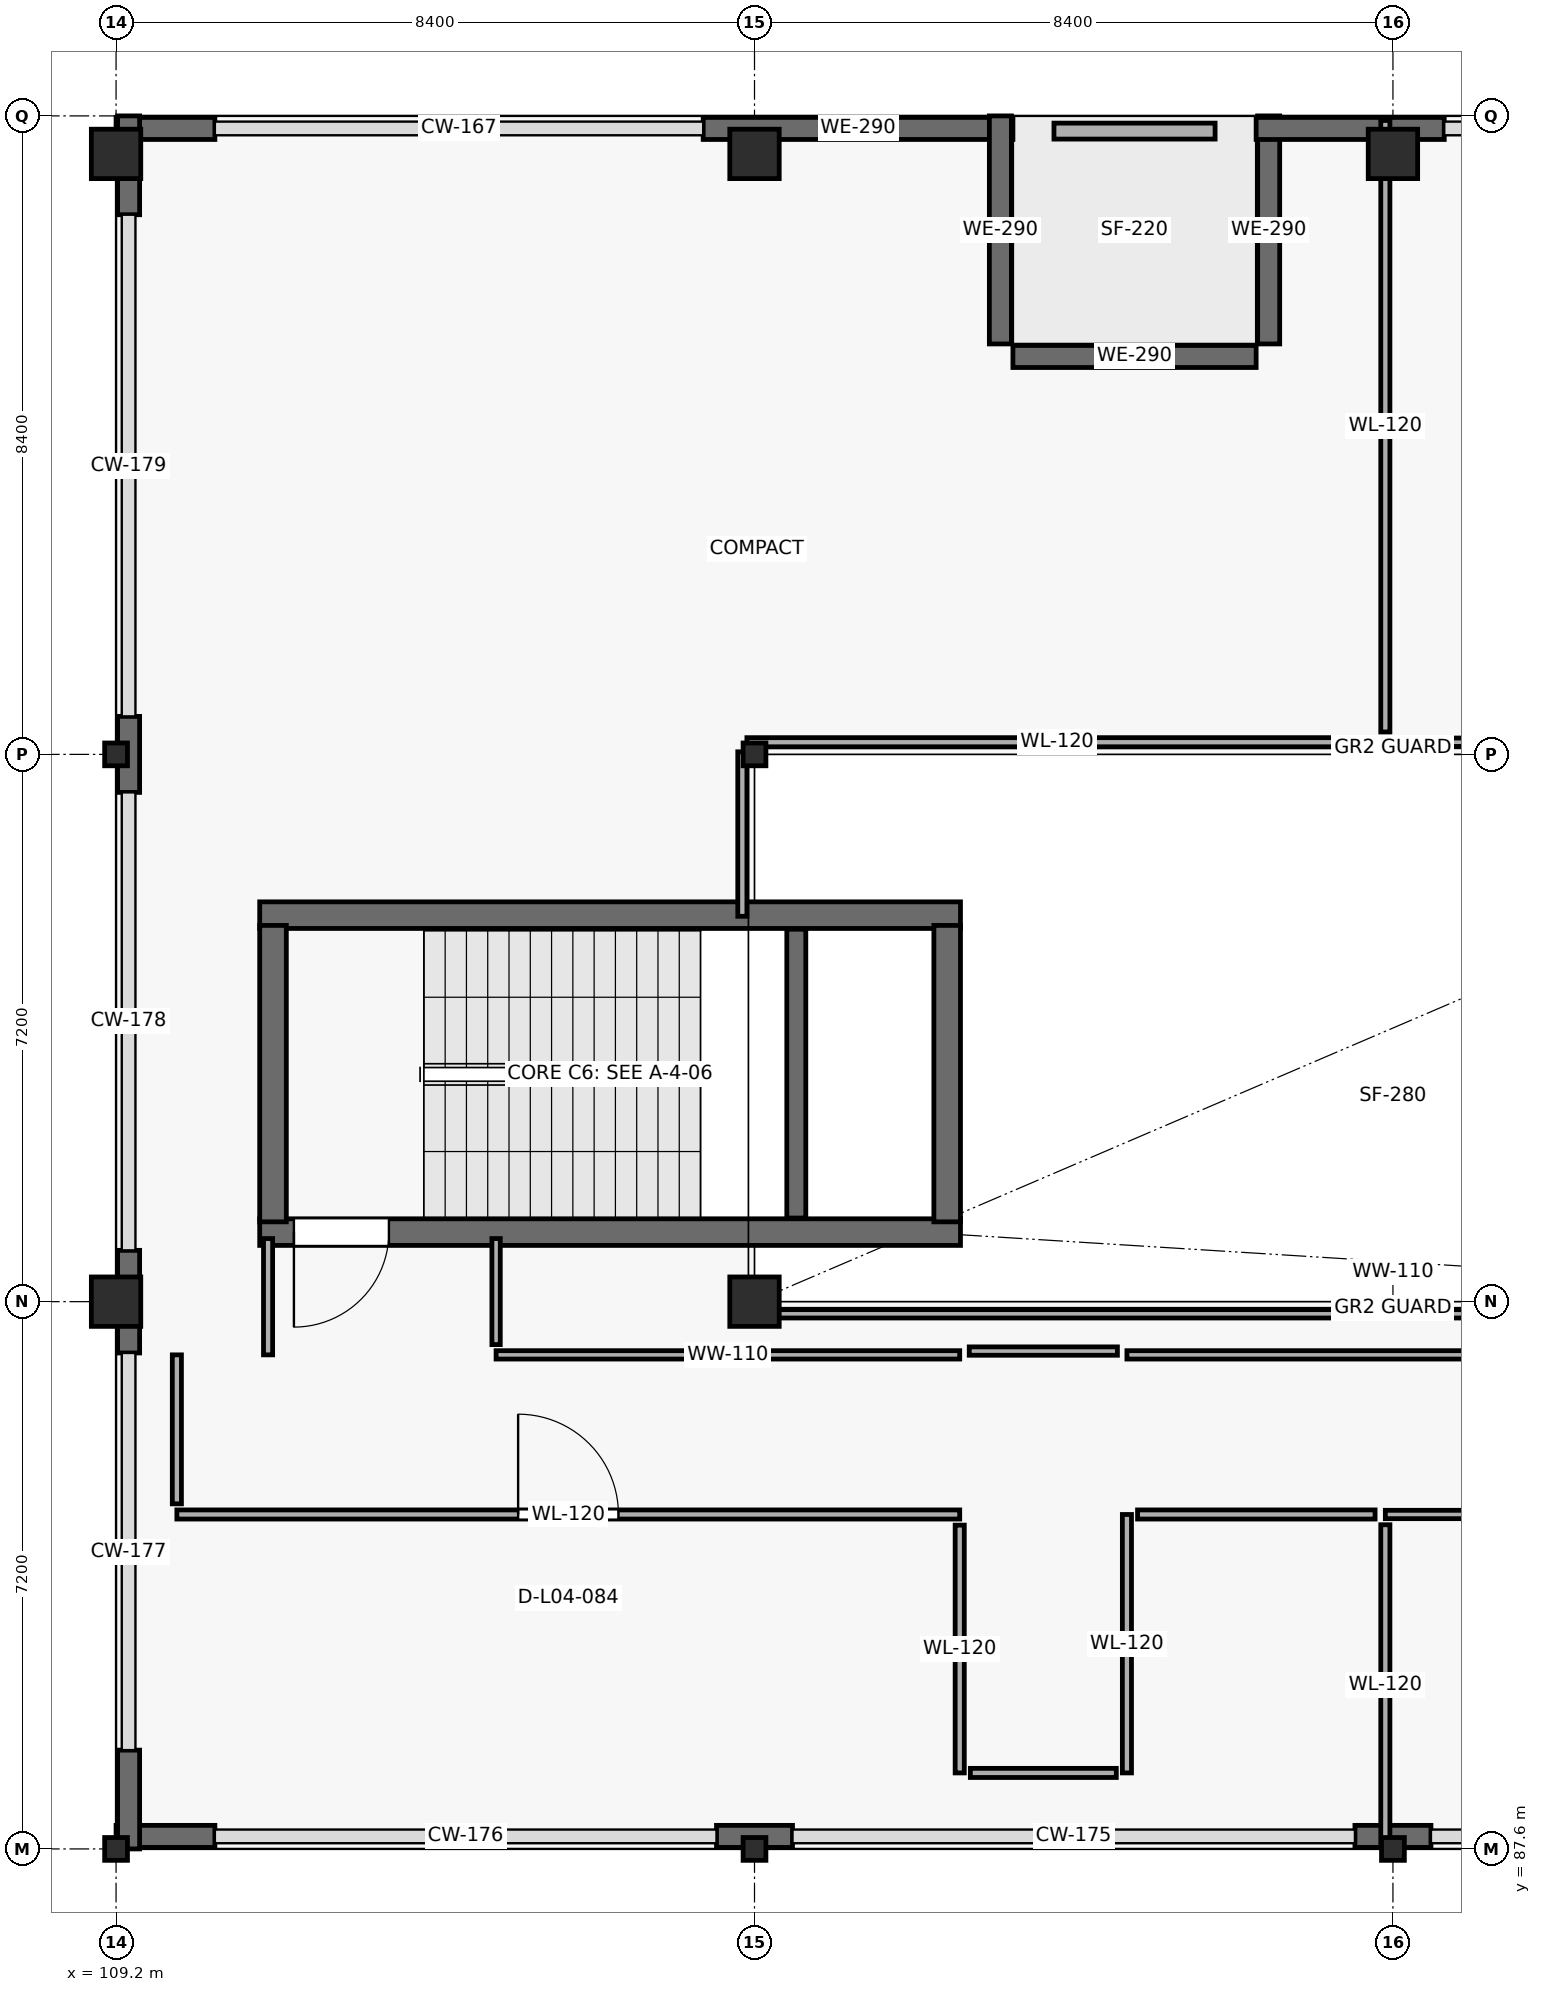
"""IFC4 building model, lengths in metres.
Left out: names, types, materials, properties, quantities, classifications, styles, units other than length and angle.
Written with IfcOpenShell. Run it as: python <this file> out.ifc"""

import sys

from ifc_helpers import new_model, si_unit, direction, frame, frame_2d, origin, origin_2d, place, context, subcontext, project, spatial, rectangle, hollow_rectangle, extrude, element, fill, save


model = new_model("IFC4")
c1 = context("Model", 3, precision=1e-05, world=origin(), true_north=direction((0.0, 1.0)))
c2 = subcontext(c1, "Body", "Model", "MODEL_VIEW")
j1 = project(units=[si_unit("LENGTHUNIT", "METRE"), si_unit("PLANEANGLEUNIT", "RADIAN")], contexts=[c1])
p1 = place(None, origin())
s1 = spatial("IfcSite", under=j1, at=p1, CompositionType="ELEMENT")
p2 = place(p1, origin())
s2 = spatial("IfcBuilding", under=s1, at=p2, CompositionType="ELEMENT")
p3 = place(p2, frame((0.0, 0.0, 15.3)))
s3 = spatial("IfcBuildingStorey", under=s2, at=p3, CompositionType="ELEMENT", Elevation=15.3)
p4 = place(p3, frame((109.2, 87.6, 0.0), z_axis=(0.0, 0.0, 1.0), x_axis=(1.0, 0.0, 0.0)))
e1 = element("IfcColumn", 1, at=p4, inside=s3, PredefinedType="COLUMN", context=c2, shape_type="SweptSolid", body=[
    extrude(hollow_rectangle(XDim=0.3, YDim=0.3, WallThickness=0.012, at=origin_2d()), origin(), (0.0, 0.0, 1.0), 5.1),
])
p5 = place(p3, frame((109.2, 94.8, 0.0), z_axis=(0.0, 0.0, 1.0), x_axis=(1.0, 0.0, 0.0)))
e2 = element("IfcColumn", 2, at=p5, inside=s3, PredefinedType="COLUMN", context=c2, shape_type="SweptSolid", body=[
    extrude(rectangle(XDim=0.65, YDim=0.65, at=origin_2d()), origin(), (0.0, 0.0, 1.0), 5.1),
])
p6 = place(p3, frame((109.2, 102.0, 0.0), z_axis=(0.0, 0.0, 1.0), x_axis=(1.0, 0.0, 0.0)))
e3 = element("IfcColumn", 3, at=p6, inside=s3, PredefinedType="COLUMN", context=c2, shape_type="SweptSolid", body=[
    extrude(hollow_rectangle(XDim=0.3, YDim=0.3, WallThickness=0.012, at=origin_2d()), origin(), (0.0, 0.0, 1.0), 5.1),
])
p7 = place(p3, frame((109.2, 109.9, 0.0), z_axis=(0.0, 0.0, 1.0), x_axis=(1.0, 0.0, 0.0)))
e4 = element("IfcColumn", 4, at=p7, inside=s3, PredefinedType="COLUMN", context=c2, shape_type="SweptSolid", body=[
    extrude(rectangle(XDim=0.65, YDim=0.65, at=origin_2d()), origin(), (0.0, 0.0, 1.0), 5.1),
])
p8 = place(p3, frame((117.6, 87.6, 0.0), z_axis=(0.0, 0.0, 1.0), x_axis=(1.0, 0.0, 0.0)))
e5 = element("IfcColumn", 5, at=p8, inside=s3, PredefinedType="COLUMN", context=c2, shape_type="SweptSolid", body=[
    extrude(hollow_rectangle(XDim=0.3, YDim=0.3, WallThickness=0.012, at=origin_2d()), origin(), (0.0, 0.0, 1.0), 5.1),
])
p9 = place(p3, frame((117.6, 94.8, 0.0), z_axis=(0.0, 0.0, 1.0), x_axis=(1.0, 0.0, 0.0)))
e6 = element("IfcColumn", 6, at=p9, inside=s3, PredefinedType="COLUMN", context=c2, shape_type="SweptSolid", body=[
    extrude(rectangle(XDim=0.65, YDim=0.65, at=origin_2d()), origin(), (0.0, 0.0, 1.0), 5.1),
])
p10 = place(p3, frame((117.6, 102.0, 0.0), z_axis=(0.0, 0.0, 1.0), x_axis=(1.0, 0.0, 0.0)))
e7 = element("IfcColumn", 7, at=p10, inside=s3, PredefinedType="COLUMN", context=c2, shape_type="SweptSolid", body=[
    extrude(hollow_rectangle(XDim=0.3, YDim=0.3, WallThickness=0.012, at=origin_2d()), origin(), (0.0, 0.0, 1.0), 5.1),
])
p11 = place(p3, frame((117.6, 109.9, 0.0), z_axis=(0.0, 0.0, 1.0), x_axis=(1.0, 0.0, 0.0)))
e8 = element("IfcColumn", 8, at=p11, inside=s3, PredefinedType="COLUMN", context=c2, shape_type="SweptSolid", body=[
    extrude(rectangle(XDim=0.65, YDim=0.65, at=origin_2d()), origin(), (0.0, 0.0, 1.0), 5.1),
])
p12 = place(p3, frame((126.0, 87.6, 0.0), z_axis=(0.0, 0.0, 1.0), x_axis=(1.0, 0.0, 0.0)))
e9 = element("IfcColumn", 9, at=p12, inside=s3, PredefinedType="COLUMN", context=c2, shape_type="SweptSolid", body=[
    extrude(hollow_rectangle(XDim=0.3, YDim=0.3, WallThickness=0.012, at=origin_2d()), origin(), (0.0, 0.0, 1.0), 5.1),
])
p13 = place(p3, frame((126.0, 109.9, 0.0), z_axis=(0.0, 0.0, 1.0), x_axis=(1.0, 0.0, 0.0)))
e10 = element("IfcColumn", 10, at=p13, inside=s3, PredefinedType="COLUMN", context=c2, shape_type="SweptSolid", body=[
    extrude(rectangle(XDim=0.65, YDim=0.65, at=origin_2d()), origin(), (0.0, 0.0, 1.0), 5.1),
])
p14 = place(p3, frame((109.2, 110.235, 0.0), z_axis=(0.0, 0.0, 1.0), x_axis=(1.0, 0.0, 0.0)))
e11 = element("IfcWall", 11, at=p14, inside=s3, PredefinedType="SOLIDWALL", context=c2, shape_type="SweptSolid", body=[
    extrude(rectangle(XDim=1.3, YDim=0.29, at=frame_2d((0.65, 0.0))), origin(), (0.0, 0.0, 1.0), 4.82),
])
p15 = place(p3, frame((116.925, 110.235, 0.0), z_axis=(0.0, 0.0, 1.0), x_axis=(1.0, 0.0, 0.0)))
e12 = element("IfcWall", 12, at=p15, inside=s3, PredefinedType="SOLIDWALL", context=c2, shape_type="SweptSolid", body=[
    extrude(rectangle(XDim=4.075, YDim=0.29, at=frame_2d((2.038, 0.0))), origin(), (0.0, 0.0, 1.0), 4.82),
])
p16 = place(p3, frame((120.835, 110.4, 0.0), z_axis=(0.0, 0.0, 1.0), x_axis=(0.0, -1.0, 0.0)))
e13 = element("IfcWall", 13, at=p16, inside=s3, PredefinedType="SOLIDWALL", context=c2, shape_type="SweptSolid", body=[
    extrude(rectangle(XDim=3.0, YDim=0.29, at=frame_2d((1.5, 0.0))), origin(), (0.0, 0.0, 1.0), 4.82),
])
p17 = place(p3, frame((121.0, 107.235, 0.0), z_axis=(0.0, 0.0, 1.0), x_axis=(1.0, 0.0, 0.0)))
e14 = element("IfcWall", 14, at=p17, inside=s3, PredefinedType="SOLIDWALL", context=c2, shape_type="SweptSolid", body=[
    extrude(rectangle(XDim=3.2, YDim=0.29, at=frame_2d((1.6, 0.0))), origin(), (0.0, 0.0, 1.0), 4.82),
])
p18 = place(p3, frame((124.365, 107.4, 0.0), z_axis=(0.0, 0.0, 1.0), x_axis=(0.0, 1.0, 0.0)))
e15 = element("IfcWall", 15, at=p18, inside=s3, PredefinedType="SOLIDWALL", context=c2, shape_type="SweptSolid", body=[
    extrude(rectangle(XDim=3.0, YDim=0.29, at=frame_2d((1.5, 0.0))), origin(), (0.0, 0.0, 1.0), 4.82),
])
p19 = place(p3, frame((124.2, 110.235, 0.0), z_axis=(0.0, 0.0, 1.0), x_axis=(1.0, 0.0, 0.0)))
e16 = element("IfcWall", 16, at=p19, inside=s3, PredefinedType="SOLIDWALL", context=c2, shape_type="SweptSolid", body=[
    extrude(rectangle(XDim=2.475, YDim=0.29, at=frame_2d((1.238, 0.0))), origin(), (0.0, 0.0, 1.0), 4.82),
])
for number, where, z_axis, x_axis in (
    (17, (126.5, 87.765, 0.0), (0.0, 0.0, 1.0), (-1.0, 0.0, 0.0)),
    (18, (118.1, 87.765, 0.0), (0.0, 0.0, 1.0), (-1.0, 0.0, 0.0)),
):
    element("IfcWall", number, at=place(p3, frame(where, z_axis=z_axis, x_axis=x_axis)), inside=s3, PredefinedType="SOLIDWALL", context=c2, shape_type="SweptSolid", body=[
        extrude(rectangle(XDim=1.0, YDim=0.29, at=frame_2d((0.5, 0.0))), origin(), (0.0, 0.0, 1.0), 4.82),
    ])
p20 = place(p3, frame((110.5, 87.765, 0.0), z_axis=(0.0, 0.0, 1.0), x_axis=(-1.0, 0.0, 0.0)))
e19 = element("IfcWall", 19, at=p20, inside=s3, PredefinedType="SOLIDWALL", context=c2, shape_type="SweptSolid", body=[
    extrude(rectangle(XDim=1.3, YDim=0.29, at=frame_2d((0.65, 0.0))), origin(), (0.0, 0.0, 1.0), 4.82),
])
p21 = place(p3, frame((109.365, 87.6, 0.0), z_axis=(0.0, 0.0, 1.0), x_axis=(0.0, 1.0, 0.0)))
e20 = element("IfcWall", 20, at=p21, inside=s3, PredefinedType="SOLIDWALL", context=c2, shape_type="SweptSolid", body=[
    extrude(rectangle(XDim=1.3, YDim=0.29, at=frame_2d((0.65, 0.0))), origin(), (0.0, 0.0, 1.0), 4.82),
])
p22 = place(p3, frame((109.365, 94.125, 0.0), z_axis=(0.0, 0.0, 1.0), x_axis=(0.0, 1.0, 0.0)))
e21 = element("IfcWall", 21, at=p22, inside=s3, PredefinedType="SOLIDWALL", context=c2, shape_type="SweptSolid", body=[
    extrude(rectangle(XDim=1.35, YDim=0.29, at=frame_2d((0.675, 0.0))), origin(), (0.0, 0.0, 1.0), 4.82),
])
p23 = place(p3, frame((109.365, 101.5, 0.0), z_axis=(0.0, 0.0, 1.0), x_axis=(0.0, 1.0, 0.0)))
e22 = element("IfcWall", 22, at=p23, inside=s3, PredefinedType="SOLIDWALL", context=c2, shape_type="SweptSolid", body=[
    extrude(rectangle(XDim=1.0, YDim=0.29, at=frame_2d((0.5, 0.0))), origin(), (0.0, 0.0, 1.0), 4.82),
])
p24 = place(p3, frame((109.365, 109.1, 0.0), z_axis=(0.0, 0.0, 1.0), x_axis=(0.0, 1.0, 0.0)))
e23 = element("IfcWall", 23, at=p24, inside=s3, PredefinedType="SOLIDWALL", context=c2, shape_type="SweptSolid", body=[
    extrude(rectangle(XDim=1.3, YDim=0.29, at=frame_2d((0.65, 0.0))), origin(), (0.0, 0.0, 1.0), 4.82),
])
p25 = place(p3, frame((121.54, 110.2, 0.0), z_axis=(0.0, 0.0, 1.0), x_axis=(1.0, 0.0, 0.0)))
e24 = element("IfcWall", 24, at=p25, inside=s3, PredefinedType="PARAPET", context=c2, shape_type="SweptSolid", body=[
    extrude(rectangle(XDim=2.12, YDim=0.21, at=frame_2d((1.06, 0.0))), origin(), (0.0, 0.0, 1.0), 1.12),
])
p26 = place(p3, frame((111.09, 95.715, 0.0), z_axis=(0.0, 0.0, 1.0), x_axis=(1.0, 0.0, 0.0)))
e25 = element("IfcWall", 25, at=p26, inside=s3, PredefinedType="SHEAR", context=c2, shape_type="SweptSolid", body=[
    extrude(rectangle(XDim=9.22, YDim=0.35, at=frame_2d((4.61, 0.0))), origin(), (0.0, 0.0, 1.0), 4.82),
])
p27 = place(p26, frame((0.45, 0.0, 0.0)))
e26 = element("IfcOpeningElement", 26, at=p27, cuts=e25, PredefinedType="OPENING", context=c2, shape_type="SweptSolid", body=[
    extrude(rectangle(XDim=1.25, YDim=2.2, at=frame_2d((0.625, 1.1))), frame((0.0, 0.185, 0.0), z_axis=(0.0, -1.0, 0.0), x_axis=(1.0, 0.0, 0.0)), (0.0, 0.0, 1.0), 0.37),
])
p28 = place(p3, frame((120.31, 99.885, 0.0), z_axis=(0.0, 0.0, 1.0), x_axis=(-1.0, 0.0, 0.0)))
e27 = element("IfcWall", 27, at=p28, inside=s3, PredefinedType="SHEAR", context=c2, shape_type="SweptSolid", body=[
    extrude(rectangle(XDim=9.22, YDim=0.35, at=frame_2d((4.61, 0.0))), origin(), (0.0, 0.0, 1.0), 4.82),
])
for number, where, z_axis, x_axis in (
    (28, (111.265, 95.85, 0.0), (0.0, 0.0, 1.0), (0.0, 1.0, 0.0)),
    (29, (120.135, 99.75, 0.0), (0.0, 0.0, 1.0), (0.0, -1.0, 0.0)),
):
    element("IfcWall", number, at=place(p3, frame(where, z_axis=z_axis, x_axis=x_axis)), inside=s3, PredefinedType="SHEAR", context=c2, shape_type="SweptSolid", body=[
        extrude(rectangle(XDim=3.9, YDim=0.35, at=frame_2d((1.95, 0.0))), origin(), (0.0, 0.0, 1.0), 4.82),
    ])
p29 = place(p3, frame((118.15, 95.9, 0.0), z_axis=(0.0, 0.0, 1.0), x_axis=(0.0, 1.0, 0.0)))
e30 = element("IfcWall", 30, at=p29, inside=s3, PredefinedType="SHEAR", context=c2, shape_type="SweptSolid", body=[
    extrude(rectangle(XDim=3.8, YDim=0.25, at=frame_2d((1.9, 0.0))), origin(), (0.0, 0.0, 1.0), 2.37),
])
p30 = place(p3, frame((141.8, 94.1, 0.0), z_axis=(0.0, 0.0, 1.0), x_axis=(-1.0, 0.0, 0.0)))
e31 = element("IfcWall", 31, at=p30, inside=s3, PredefinedType="PARTITIONING", context=c2, shape_type="SweptSolid", body=[
    extrude(rectangle(XDim=19.3, YDim=0.11, at=frame_2d((9.65, 0.0))), origin(), (0.0, 0.0, 1.0), 4.82),
])
p31 = place(p30, frame((3.878, 0.0, 0.0)))
e32 = element("IfcOpeningElement", 32, at=p31, cuts=e31, PredefinedType="OPENING", context=c2, shape_type="SweptSolid", body=[
    extrude(rectangle(XDim=2.28, YDim=2.75, at=frame_2d((1.14, 1.375))), frame((0.0, 0.065, 0.0), z_axis=(0.0, -1.0, 0.0), x_axis=(1.0, 0.0, 0.0)), (0.0, 0.0, 1.0), 0.13),
])
p32 = place(p3, frame((117.5, 94.64, 0.0), z_axis=(0.0, 0.0, 1.0), x_axis=(1.0, 0.0, 0.0)))
e33 = element("IfcWall", 33, at=p32, inside=s3, PredefinedType="PARTITIONING", context=c2, shape_type="SweptSolid", body=[
    extrude(rectangle(XDim=17.0, YDim=0.11, at=frame_2d((8.5, 0.0))), origin(), (0.0, 0.0, 1.0), 3.35),
])
p33 = place(p3, frame((125.9, 92.0, 0.0), z_axis=(0.0, 0.0, 1.0), x_axis=(1.0, 0.0, 0.0)))
e34 = element("IfcWall", 34, at=p33, inside=s3, PredefinedType="PARTITIONING", context=c2, shape_type="SweptSolid", body=[
    extrude(rectangle(XDim=15.9, YDim=0.11, at=frame_2d((7.95, 0.0))), origin(), (0.0, 0.0, 1.0), 4.82),
])
p34 = place(p3, frame((110.0, 92.0, 0.0), z_axis=(0.0, 0.0, 1.0), x_axis=(1.0, 0.0, 0.0)))
e35 = element("IfcWall", 35, at=p34, inside=s3, PredefinedType="PARTITIONING", context=c2, shape_type="SweptSolid", body=[
    extrude(rectangle(XDim=10.3, YDim=0.12, at=frame_2d((5.15, 0.0))), origin(), (0.0, 0.0, 1.0), 4.82),
])
p35 = place(p34, frame((4.49, 0.0, 0.0)))
e36 = element("IfcOpeningElement", 36, at=p35, cuts=e35, PredefinedType="OPENING", context=c2, shape_type="SweptSolid", body=[
    extrude(rectangle(XDim=1.32, YDim=2.24, at=frame_2d((0.66, 1.12))), frame((0.0, 0.07, 0.0), z_axis=(0.0, -1.0, 0.0), x_axis=(1.0, 0.0, 0.0)), (0.0, 0.0, 1.0), 0.14),
])
p36 = place(p3, frame((134.5, 102.16, 0.0), z_axis=(0.0, 0.0, 1.0), x_axis=(-1.0, 0.0, 0.0)))
e37 = element("IfcWall", 37, at=p36, inside=s3, PredefinedType="PARTITIONING", context=c2, shape_type="SweptSolid", body=[
    extrude(rectangle(XDim=8.7, YDim=0.11, at=frame_2d((4.35, 0.0))), origin(), (0.0, 0.0, 1.0), 3.45),
])
p37 = place(p3, frame((125.665, 102.16, 0.0), z_axis=(0.0, 0.0, 1.0), x_axis=(-1.0, 0.0, 0.0)))
e38 = element("IfcWall", 38, at=p37, inside=s3, PredefinedType="PARTITIONING", context=c2, shape_type="SweptSolid", body=[
    extrude(rectangle(XDim=8.165, YDim=0.12, at=frame_2d((4.083, 0.0))), origin(), (0.0, 0.0, 1.0), 3.45),
])
p38 = place(p3, frame((125.9, 110.34, 0.0), z_axis=(0.0, 0.0, 1.0), x_axis=(0.0, -1.0, 0.0)))
e39 = element("IfcWall", 39, at=p38, inside=s3, PredefinedType="PARTITIONING", context=c2, shape_type="SweptSolid", body=[
    extrude(rectangle(XDim=8.045, YDim=0.12, at=frame_2d((4.022, 0.0))), origin(), (0.0, 0.0, 1.0), 3.45),
])
p39 = place(p3, frame((120.3, 94.1, 0.0), z_axis=(0.0, 0.0, 1.0), x_axis=(-1.0, 0.0, 0.0)))
e40 = element("IfcWall", 40, at=p39, inside=s3, PredefinedType="PARTITIONING", context=c2, shape_type="SweptSolid", body=[
    extrude(rectangle(XDim=6.1, YDim=0.11, at=frame_2d((3.05, 0.0))), origin(), (0.0, 0.0, 1.0), 4.82),
])
p40 = place(p3, frame((125.9, 91.865, 0.0), z_axis=(0.0, 0.0, 1.0), x_axis=(0.0, -1.0, 0.0)))
e41 = element("IfcWall", 41, at=p40, inside=s3, PredefinedType="PARTITIONING", context=c2, shape_type="SweptSolid", body=[
    extrude(rectangle(XDim=4.205, YDim=0.12, at=frame_2d((2.103, 0.0))), origin(), (0.0, 0.0, 1.0), 3.45),
])
p41 = place(p3, frame((120.3, 91.86, 0.0), z_axis=(0.0, 0.0, 1.0), x_axis=(0.0, -1.0, 0.0)))
e42 = element("IfcWall", 42, at=p41, inside=s3, PredefinedType="PARTITIONING", context=c2, shape_type="SweptSolid", body=[
    extrude(rectangle(XDim=3.26, YDim=0.12, at=frame_2d((1.63, 0.0))), origin(), (0.0, 0.0, 1.0), 4.82),
])
p42 = place(p3, frame((122.5, 88.6, 0.0), z_axis=(0.0, 0.0, 1.0), x_axis=(0.0, 1.0, 0.0)))
e43 = element("IfcWall", 43, at=p42, inside=s3, PredefinedType="PARTITIONING", context=c2, shape_type="SweptSolid", body=[
    extrude(rectangle(XDim=3.4, YDim=0.12, at=frame_2d((1.7, 0.0))), origin(), (0.0, 0.0, 1.0), 4.82),
])
p43 = place(p3, frame((122.64, 92.0, 0.0), z_axis=(0.0, 0.0, 1.0), x_axis=(1.0, 0.0, 0.0)))
e44 = element("IfcWall", 44, at=p43, inside=s3, PredefinedType="PARTITIONING", context=c2, shape_type="SweptSolid", body=[
    extrude(rectangle(XDim=3.125, YDim=0.12, at=frame_2d((1.562, 0.0))), origin(), (0.0, 0.0, 1.0), 4.82),
])
p44 = place(p3, frame((117.44, 102.034, 0.0), z_axis=(0.0, 0.0, 1.0), x_axis=(0.0, -1.0, 0.0)))
e45 = element("IfcWall", 45, at=p44, inside=s3, PredefinedType="PARTITIONING", context=c2, shape_type="SweptSolid", body=[
    extrude(rectangle(XDim=2.164, YDim=0.12, at=frame_2d((1.082, 0.0))), origin(), (0.0, 0.0, 1.0), 4.82),
])
p45 = place(p3, frame((120.44, 88.6, 0.0), z_axis=(0.0, 0.0, 1.0), x_axis=(1.0, 0.0, 0.0)))
e46 = element("IfcWall", 46, at=p45, inside=s3, PredefinedType="PARTITIONING", context=c2, shape_type="SweptSolid", body=[
    extrude(rectangle(XDim=1.92, YDim=0.12, at=frame_2d((0.96, 0.0))), origin(), (0.0, 0.0, 1.0), 4.82),
])
p46 = place(p3, frame((122.375, 94.15, 0.0), z_axis=(0.0, 0.0, 1.0), x_axis=(-1.0, 0.0, 0.0)))
e47 = element("IfcWall", 47, at=p46, inside=s3, PredefinedType="PARTITIONING", context=c2, shape_type="SweptSolid", body=[
    extrude(rectangle(XDim=1.949, YDim=0.11, at=frame_2d((0.975, 0.0))), origin(), (0.0, 0.0, 1.0), 4.82),
])
p47 = place(p3, frame((110.0, 94.1, 0.0), z_axis=(0.0, 0.0, 1.0), x_axis=(0.0, -1.0, 0.0)))
e48 = element("IfcWall", 48, at=p47, inside=s3, PredefinedType="PARTITIONING", context=c2, shape_type="SweptSolid", body=[
    extrude(rectangle(XDim=1.96, YDim=0.12, at=frame_2d((0.98, 0.0))), origin(), (0.0, 0.0, 1.0), 4.82),
])
p48 = place(p3, frame((111.2, 95.63, 0.0), z_axis=(0.0, 0.0, 1.0), x_axis=(0.0, -1.0, 0.0)))
e49 = element("IfcWall", 49, at=p48, inside=s3, PredefinedType="PARTITIONING", context=c2, shape_type="SweptSolid", body=[
    extrude(rectangle(XDim=1.53, YDim=0.12, at=frame_2d((0.765, 0.0))), origin(), (0.0, 0.0, 1.0), 4.82),
])
p49 = place(p3, frame((114.2, 94.235, 0.0), z_axis=(0.0, 0.0, 1.0), x_axis=(0.0, 1.0, 0.0)))
e50 = element("IfcWall", 50, at=p49, inside=s3, PredefinedType="PARTITIONING", context=c2, shape_type="SweptSolid", body=[
    extrude(rectangle(XDim=1.395, YDim=0.11, at=frame_2d((0.697, 0.0))), origin(), (0.0, 0.0, 1.0), 4.82),
])
p50 = place(p27, origin())
e51 = element("IfcDoor", 51, at=p50, inside=s3, OperationType="SINGLE_SWING_RIGHT", PredefinedType="DOOR", context=c2, shape_type="SweptSolid", body=[
    extrude(rectangle(XDim=1.25, YDim=2.2, at=frame_2d((0.625, 1.1))), frame((0.0, 0.025, 0.0), z_axis=(0.0, -1.0, 0.0), x_axis=(1.0, 0.0, 0.0)), (0.0, 0.0, 1.0), 0.05),
])
fill(e26, e51)
p51 = place(p35, origin())
e52 = element("IfcDoor", 52, at=p51, inside=s3, OperationType="SINGLE_SWING_LEFT", PredefinedType="DOOR", context=c2, shape_type="SweptSolid", body=[
    extrude(rectangle(XDim=1.32, YDim=2.24, at=frame_2d((0.66, 1.12))), frame((0.0, 0.025, 0.0), z_axis=(0.0, -1.0, 0.0), x_axis=(1.0, 0.0, 0.0)), (0.0, 0.0, 1.0), 0.05),
])
fill(e36, e52)
save(model, sys.argv[1])
